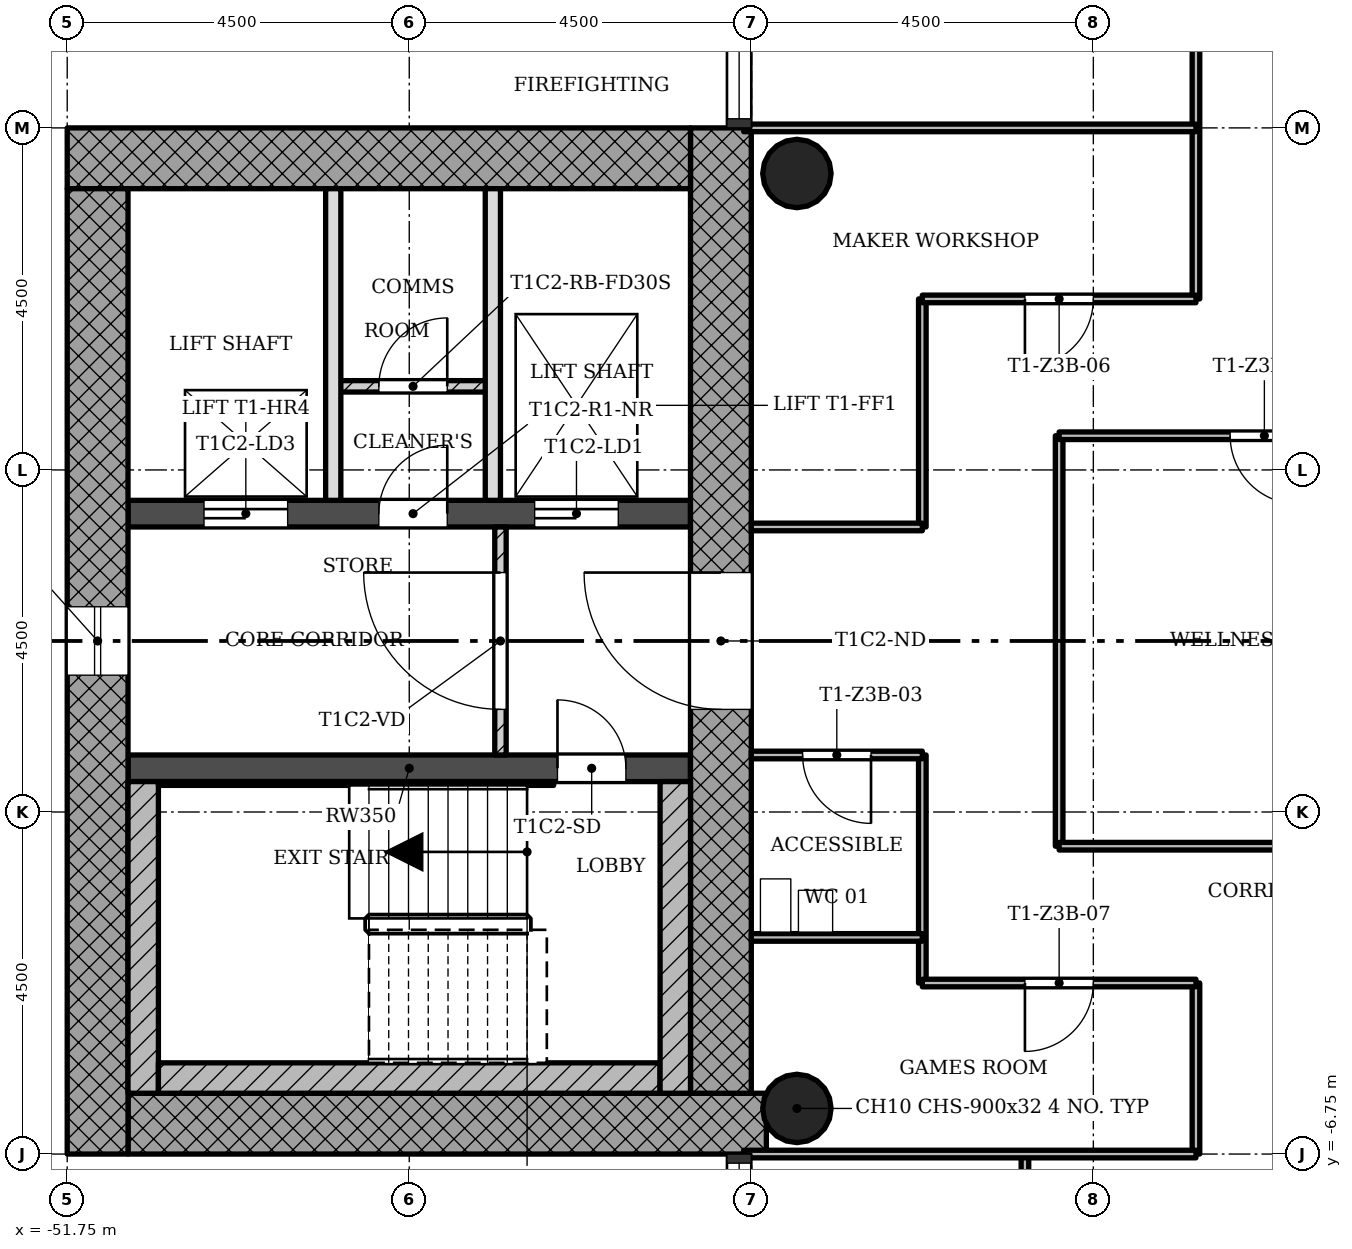
"""IFC4 building model, lengths in metres.
Left out: names, types, materials, properties, quantities, classifications, styles, units other than length and angle.
Written with IfcOpenShell. Run it as: python <this file> out.ifc"""

import sys

from ifc_helpers import new_model, si_unit, direction, frame, frame_2d, origin, origin_2d, place, context, subcontext, project, spatial, rectangle, hollow_circle, extrude, element, fill, save


model = new_model("IFC4")
c1 = context("Model", 3, precision=1e-05, world=origin(), true_north=direction((0.0, 1.0)))
c2 = subcontext(c1, "Body", "Model", "MODEL_VIEW")
j1 = project(units=[si_unit("LENGTHUNIT", "METRE"), si_unit("PLANEANGLEUNIT", "RADIAN")], contexts=[c1])
p1 = place(None, origin())
s1 = spatial("IfcSite", under=j1, at=p1, CompositionType="ELEMENT")
p2 = place(p1, origin())
s2 = spatial("IfcBuilding", under=s1, at=p2, CompositionType="ELEMENT")
p3 = place(p2, frame((0.0, 0.0, 143.9)))
s3 = spatial("IfcBuildingStorey", under=s2, at=p3, CompositionType="ELEMENT", Elevation=143.9)
p4 = place(p3, frame((-50.95, -6.35, 0.0), z_axis=(0.0, 0.0, 1.0), x_axis=(1.0, 0.0, 0.0)))
e1 = element("IfcWall", 1, at=p4, inside=s3, PredefinedType="SHEAR", context=c2, shape_type="SweptSolid", body=[
    extrude(rectangle(XDim=8.398, YDim=0.8, at=frame_2d((4.199, 0.0))), origin(), (0.0, 0.0, 1.0), 3.4),
])
p5 = place(p3, frame((-43.15, -5.95, 0.0), z_axis=(0.0, 0.0, 1.0), x_axis=(0.0, 1.0, 0.0)))
e2 = element("IfcWall", 2, at=p5, inside=s3, PredefinedType="SHEAR", context=c2, shape_type="SweptSolid", body=[
    extrude(rectangle(XDim=12.7, YDim=0.8, at=frame_2d((6.35, 0.0))), origin(), (0.0, 0.0, 1.0), 3.4),
])
p6 = place(p5, frame((5.05, 0.0, 0.0)))
e3 = element("IfcOpeningElement", 3, at=p6, cuts=e2, PredefinedType="OPENING", context=c2, shape_type="SweptSolid", body=[
    extrude(rectangle(XDim=1.8, YDim=2.1, at=frame_2d((0.9, 1.05))), frame((0.0, 0.41, 0.0), z_axis=(0.0, -1.0, 0.0), x_axis=(1.0, 0.0, 0.0)), (0.0, 0.0, 1.0), 0.82),
])
p7 = place(p3, frame((-43.55, 6.35, 0.0), z_axis=(0.0, 0.0, 1.0), x_axis=(-1.0, 0.0, 0.0)))
e4 = element("IfcWall", 4, at=p7, inside=s3, PredefinedType="SHEAR", context=c2, shape_type="SweptSolid", body=[
    extrude(rectangle(XDim=8.2, YDim=0.8, at=frame_2d((4.1, 0.0))), origin(), (0.0, 0.0, 1.0), 3.4),
])
p8 = place(p3, frame((-51.35, 5.95, 0.0), z_axis=(0.0, 0.0, 1.0), x_axis=(0.0, -1.0, 0.0)))
e5 = element("IfcWall", 5, at=p8, inside=s3, PredefinedType="SHEAR", context=c2, shape_type="SweptSolid", body=[
    extrude(rectangle(XDim=12.7, YDim=0.8, at=frame_2d((6.35, 0.0))), origin(), (0.0, 0.0, 1.0), 3.4),
])
p9 = place(p8, frame((5.5, 0.0, 0.45)))
e6 = element("IfcOpeningElement", 6, at=p9, cuts=e5, PredefinedType="OPENING", context=c2, shape_type="SweptSolid", body=[
    extrude(rectangle(XDim=0.9, YDim=2.4, at=frame_2d((0.45, 1.2))), frame((0.0, 0.41, 0.0), z_axis=(0.0, -1.0, 0.0), x_axis=(1.0, 0.0, 0.0)), (0.0, 0.0, 1.0), 0.82),
])
p10 = place(p3, frame((-50.95, -1.675, 0.0), z_axis=(0.0, 0.0, 1.0), x_axis=(1.0, 0.0, 0.0)))
e7 = element("IfcWall", 7, at=p10, inside=s3, PredefinedType="SHEAR", context=c2, shape_type="SweptSolid", body=[
    extrude(rectangle(XDim=7.4, YDim=0.35, at=frame_2d((3.7, 0.0))), origin(), (0.0, 0.0, 1.0), 3.4),
])
p11 = place(p10, frame((5.65, 0.0, 0.0)))
e8 = element("IfcOpeningElement", 8, at=p11, cuts=e7, PredefinedType="OPENING", context=c2, shape_type="SweptSolid", body=[
    extrude(rectangle(XDim=0.9, YDim=2.1, at=frame_2d((0.45, 1.05))), frame((0.0, 0.185, 0.0), z_axis=(0.0, -1.0, 0.0), x_axis=(1.0, 0.0, 0.0)), (0.0, 0.0, 1.0), 0.37),
])
p12 = place(p3, frame((-50.95, 1.675, 0.0), z_axis=(0.0, 0.0, 1.0), x_axis=(1.0, 0.0, 0.0)))
e9 = element("IfcWall", 9, at=p12, inside=s3, PredefinedType="SHEAR", context=c2, shape_type="SweptSolid", body=[
    extrude(rectangle(XDim=7.4, YDim=0.35, at=frame_2d((3.7, 0.0))), origin(), (0.0, 0.0, 1.0), 3.4),
])
p13 = place(p12, frame((5.35, 0.0, 0.0)))
e10 = element("IfcOpeningElement", 10, at=p13, cuts=e9, PredefinedType="OPENING", context=c2, shape_type="SweptSolid", body=[
    extrude(rectangle(XDim=1.1, YDim=2.1, at=frame_2d((0.55, 1.05))), frame((0.0, 0.185, 0.0), z_axis=(0.0, -1.0, 0.0), x_axis=(1.0, 0.0, 0.0)), (0.0, 0.0, 1.0), 0.37),
])
p14 = place(p12, frame((1.0, 0.0, 0.0)))
e11 = element("IfcOpeningElement", 11, at=p14, cuts=e9, PredefinedType="OPENING", context=c2, shape_type="SweptSolid", body=[
    extrude(rectangle(XDim=1.1, YDim=2.1, at=frame_2d((0.55, 1.05))), frame((0.0, 0.185, 0.0), z_axis=(0.0, -1.0, 0.0), x_axis=(1.0, 0.0, 0.0)), (0.0, 0.0, 1.0), 0.37),
])
p15 = place(p12, frame((3.3, 0.0, 0.0)))
e12 = element("IfcOpeningElement", 12, at=p15, cuts=e9, PredefinedType="OPENING", context=c2, shape_type="SweptSolid", body=[
    extrude(rectangle(XDim=0.9, YDim=2.1, at=frame_2d((0.45, 1.05))), frame((0.0, 0.185, 0.0), z_axis=(0.0, -1.0, 0.0), x_axis=(1.0, 0.0, 0.0)), (0.0, 0.0, 1.0), 0.37),
])
for number, where, z_axis, x_axis in (
    (13, (-42.15, -6.15, 0.0), (0.0, 0.0, 1.0), (1.0, 0.0, 0.0)),
    (14, (-42.15, 6.15, 0.0), (0.0, 0.0, 1.0), (1.0, 0.0, 0.0)),
):
    element("IfcColumn", number, at=place(p3, frame(where, z_axis=z_axis, x_axis=x_axis)), inside=s3, PredefinedType="COLUMN", context=c2, shape_type="SweptSolid", body=[
        extrude(hollow_circle(Radius=0.45, WallThickness=0.032, at=origin_2d()), origin(), (0.0, 0.0, 1.0), 3.4),
    ])
p16 = place(p3, frame((-46.05, 1.5, 0.0), z_axis=(0.0, 0.0, 1.0), x_axis=(0.0, -1.0, 0.0)))
e15 = element("IfcWall", 15, at=p16, inside=s3, PredefinedType="PARTITIONING", context=c2, shape_type="SweptSolid", body=[
    extrude(rectangle(XDim=3.0, YDim=0.15, at=frame_2d((1.5, 0.0))), origin(), (0.0, 0.0, 1.0), 3.0),
])
p17 = place(p16, frame((0.6, 0.0, 0.0)))
e16 = element("IfcOpeningElement", 16, at=p17, cuts=e15, PredefinedType="OPENING", context=c2, shape_type="SweptSolid", body=[
    extrude(rectangle(XDim=1.8, YDim=2.1, at=frame_2d((0.9, 1.05))), frame((0.0, 0.085, 0.0), z_axis=(0.0, -1.0, 0.0), x_axis=(1.0, 0.0, 0.0)), (0.0, 0.0, 1.0), 0.17),
])
for number, where, z_axis, x_axis in (
    (17, (-48.25, 5.95, 0.0), (0.0, 0.0, 1.0), (0.0, -1.0, 0.0)),
    (18, (-46.15, 5.95, 0.0), (0.0, 0.0, 1.0), (0.0, -1.0, 0.0)),
):
    element("IfcWall", number, at=place(p3, frame(where, z_axis=z_axis, x_axis=x_axis)), inside=s3, PredefinedType="SOLIDWALL", context=c2, shape_type="SweptSolid", body=[
        extrude(rectangle(XDim=4.1, YDim=0.2, at=frame_2d((2.05, 0.0))), origin(), (0.0, 0.0, 1.0), 3.0),
    ])
p18 = place(p3, frame((-46.15, 3.35, 0.0), z_axis=(0.0, 0.0, 1.0), x_axis=(-1.0, 0.0, 0.0)))
e19 = element("IfcWall", 19, at=p18, inside=s3, PredefinedType="PARTITIONING", context=c2, shape_type="SweptSolid", body=[
    extrude(rectangle(XDim=2.1, YDim=0.15, at=frame_2d((1.05, 0.0))), origin(), (0.0, 0.0, 1.0), 3.0),
])
p19 = place(p18, frame((0.6, 0.0, 0.0)))
e20 = element("IfcOpeningElement", 20, at=p19, cuts=e19, PredefinedType="OPENING", context=c2, shape_type="SweptSolid", body=[
    extrude(rectangle(XDim=0.9, YDim=2.1, at=frame_2d((0.45, 1.05))), frame((0.0, 0.085, 0.0), z_axis=(0.0, -1.0, 0.0), x_axis=(1.0, 0.0, 0.0)), (0.0, 0.0, 1.0), 0.17),
])
for number, where, z_axis, x_axis in (
    (21, (-40.5, -4.5, 0.0), (0.0, 0.0, 1.0), (0.0, 1.0, 0.0)),
    (22, (-40.5, 1.5, 0.0), (0.0, 0.0, 1.0), (0.0, 1.0, 0.0)),
):
    element("IfcWall", number, at=place(p3, frame(where, z_axis=z_axis, x_axis=x_axis)), inside=s3, PredefinedType="PARTITIONING", context=c2, shape_type="SweptSolid", body=[
        extrude(rectangle(XDim=3.0, YDim=0.1, at=frame_2d((1.5, 0.0))), origin(), (0.0, 0.0, 1.0), 3.0),
    ])
p20 = place(p3, frame((-39.15, -15.75, 0.0), z_axis=(0.0, 0.0, 1.0), x_axis=(0.0, 1.0, 0.0)))
e23 = element("IfcWall", 23, at=p20, inside=s3, PredefinedType="PARTITIONING", context=c2, shape_type="SweptSolid", body=[
    extrude(rectangle(XDim=9.0, YDim=0.1, at=frame_2d((4.5, 0.0))), origin(), (0.0, 0.0, 1.0), 3.0),
])
p21 = place(p20, frame((5.55, 0.0, 0.0)))
e24 = element("IfcOpeningElement", 24, at=p21, cuts=e23, PredefinedType="OPENING", context=c2, shape_type="SweptSolid", body=[
    extrude(rectangle(XDim=0.9, YDim=2.1, at=frame_2d((0.45, 1.05))), frame((0.0, 0.06, 0.0), z_axis=(0.0, -1.0, 0.0), x_axis=(1.0, 0.0, 0.0)), (0.0, 0.0, 1.0), 0.12),
])
p22 = place(p3, frame((-38.7, -2.7, 0.0), z_axis=(0.0, 0.0, 1.0), x_axis=(0.0, 1.0, 0.0)))
e25 = element("IfcWall", 25, at=p22, inside=s3, PredefinedType="PARTITIONING", context=c2, shape_type="SweptSolid", body=[
    extrude(rectangle(XDim=5.4, YDim=0.1, at=frame_2d((2.7, 0.0))), origin(), (0.0, 0.0, 1.0), 3.0),
])
p23 = place(p3, frame((-36.9, -6.75, 0.0), z_axis=(0.0, 0.0, 1.0), x_axis=(0.0, 1.0, 0.0)))
e26 = element("IfcWall", 26, at=p23, inside=s3, PredefinedType="PARTITIONING", context=c2, shape_type="SweptSolid", body=[
    extrude(rectangle(XDim=2.25, YDim=0.1, at=frame_2d((1.125, 0.0))), origin(), (0.0, 0.0, 1.0), 3.0),
])
p24 = place(p3, frame((-36.9, 4.5, 0.0), z_axis=(0.0, 0.0, 1.0), x_axis=(0.0, 1.0, 0.0)))
e27 = element("IfcWall", 27, at=p24, inside=s3, PredefinedType="PARTITIONING", context=c2, shape_type="SweptSolid", body=[
    extrude(rectangle(XDim=6.75, YDim=0.1, at=frame_2d((3.375, 0.0))), origin(), (0.0, 0.0, 1.0), 3.0),
])
p25 = place(p24, frame((4.05, 0.0, 0.0)))
e28 = element("IfcOpeningElement", 28, at=p25, cuts=e27, PredefinedType="OPENING", context=c2, shape_type="SweptSolid", body=[
    extrude(rectangle(XDim=0.9, YDim=2.1, at=frame_2d((0.45, 1.05))), frame((0.0, 0.06, 0.0), z_axis=(0.0, -1.0, 0.0), x_axis=(1.0, 0.0, 0.0)), (0.0, 0.0, 1.0), 0.12),
])
p26 = place(p3, frame((-42.85, -6.75, 0.0), z_axis=(0.0, 0.0, 1.0), x_axis=(1.0, 0.0, 0.0)))
e29 = element("IfcWall", 29, at=p26, inside=s3, PredefinedType="PARTITIONING", context=c2, shape_type="SweptSolid", body=[
    extrude(rectangle(XDim=5.95, YDim=0.1, at=frame_2d((2.975, 0.0))), origin(), (0.0, 0.0, 1.0), 3.0),
])
p27 = place(p3, frame((-40.5, -4.5, 0.0), z_axis=(0.0, 0.0, 1.0), x_axis=(1.0, 0.0, 0.0)))
e30 = element("IfcWall", 30, at=p27, inside=s3, PredefinedType="PARTITIONING", context=c2, shape_type="SweptSolid", body=[
    extrude(rectangle(XDim=3.6, YDim=0.1, at=frame_2d((1.8, 0.0))), origin(), (0.0, 0.0, 1.0), 3.0),
])
p28 = place(p27, frame((1.35, 0.0, 0.0)))
e31 = element("IfcOpeningElement", 31, at=p28, cuts=e30, PredefinedType="OPENING", context=c2, shape_type="SweptSolid", body=[
    extrude(rectangle(XDim=0.9, YDim=2.1, at=frame_2d((0.45, 1.05))), frame((0.0, 0.06, 0.0), z_axis=(0.0, -1.0, 0.0), x_axis=(1.0, 0.0, 0.0)), (0.0, 0.0, 1.0), 0.12),
])
p29 = place(p3, frame((-42.75, -3.9, 0.0), z_axis=(0.0, 0.0, 1.0), x_axis=(1.0, 0.0, 0.0)))
e32 = element("IfcWall", 32, at=p29, inside=s3, PredefinedType="PARTITIONING", context=c2, shape_type="SweptSolid", body=[
    extrude(rectangle(XDim=2.25, YDim=0.1, at=frame_2d((1.125, 0.0))), origin(), (0.0, 0.0, 1.0), 3.0),
])
p30 = place(p3, frame((-38.7, -2.7, 0.0), z_axis=(0.0, 0.0, 1.0), x_axis=(1.0, 0.0, 0.0)))
e33 = element("IfcWall", 33, at=p30, inside=s3, PredefinedType="PARTITIONING", context=c2, shape_type="SweptSolid", body=[
    extrude(rectangle(XDim=5.4, YDim=0.1, at=frame_2d((2.7, 0.0))), origin(), (0.0, 0.0, 1.0), 3.0),
])
p31 = place(p3, frame((-42.75, -1.5, 0.0), z_axis=(0.0, 0.0, 1.0), x_axis=(1.0, 0.0, 0.0)))
e34 = element("IfcWall", 34, at=p31, inside=s3, PredefinedType="PARTITIONING", context=c2, shape_type="SweptSolid", body=[
    extrude(rectangle(XDim=2.25, YDim=0.1, at=frame_2d((1.125, 0.0))), origin(), (0.0, 0.0, 1.0), 3.0),
])
p32 = place(p31, frame((0.675, 0.0, 0.0)))
e35 = element("IfcOpeningElement", 35, at=p32, cuts=e34, PredefinedType="OPENING", context=c2, shape_type="SweptSolid", body=[
    extrude(rectangle(XDim=0.9, YDim=2.1, at=frame_2d((0.45, 1.05))), frame((0.0, 0.06, 0.0), z_axis=(0.0, -1.0, 0.0), x_axis=(1.0, 0.0, 0.0)), (0.0, 0.0, 1.0), 0.12),
])
p33 = place(p3, frame((-42.75, 1.5, 0.0), z_axis=(0.0, 0.0, 1.0), x_axis=(1.0, 0.0, 0.0)))
e36 = element("IfcWall", 36, at=p33, inside=s3, PredefinedType="PARTITIONING", context=c2, shape_type="SweptSolid", body=[
    extrude(rectangle(XDim=2.25, YDim=0.1, at=frame_2d((1.125, 0.0))), origin(), (0.0, 0.0, 1.0), 3.0),
])
p34 = place(p3, frame((-38.7, 2.7, 0.0), z_axis=(0.0, 0.0, 1.0), x_axis=(1.0, 0.0, 0.0)))
e37 = element("IfcWall", 37, at=p34, inside=s3, PredefinedType="PARTITIONING", context=c2, shape_type="SweptSolid", body=[
    extrude(rectangle(XDim=5.4, YDim=0.1, at=frame_2d((2.7, 0.0))), origin(), (0.0, 0.0, 1.0), 3.0),
])
p35 = place(p34, frame((2.25, 0.0, 0.0)))
e38 = element("IfcOpeningElement", 38, at=p35, cuts=e37, PredefinedType="OPENING", context=c2, shape_type="SweptSolid", body=[
    extrude(rectangle(XDim=0.9, YDim=2.1, at=frame_2d((0.45, 1.05))), frame((0.0, 0.06, 0.0), z_axis=(0.0, -1.0, 0.0), x_axis=(1.0, 0.0, 0.0)), (0.0, 0.0, 1.0), 0.12),
])
p36 = place(p3, frame((-40.5, 4.5, 0.0), z_axis=(0.0, 0.0, 1.0), x_axis=(1.0, 0.0, 0.0)))
e39 = element("IfcWall", 39, at=p36, inside=s3, PredefinedType="PARTITIONING", context=c2, shape_type="SweptSolid", body=[
    extrude(rectangle(XDim=3.6, YDim=0.1, at=frame_2d((1.8, 0.0))), origin(), (0.0, 0.0, 1.0), 3.0),
])
p37 = place(p36, frame((1.35, 0.0, 0.0)))
e40 = element("IfcOpeningElement", 40, at=p37, cuts=e39, PredefinedType="OPENING", context=c2, shape_type="SweptSolid", body=[
    extrude(rectangle(XDim=0.9, YDim=2.1, at=frame_2d((0.45, 1.05))), frame((0.0, 0.06, 0.0), z_axis=(0.0, -1.0, 0.0), x_axis=(1.0, 0.0, 0.0)), (0.0, 0.0, 1.0), 0.12),
])
p38 = place(p3, frame((-42.85, 6.75, 0.0), z_axis=(0.0, 0.0, 1.0), x_axis=(1.0, 0.0, 0.0)))
e41 = element("IfcWall", 41, at=p38, inside=s3, PredefinedType="PARTITIONING", context=c2, shape_type="SweptSolid", body=[
    extrude(rectangle(XDim=5.95, YDim=0.1, at=frame_2d((2.975, 0.0))), origin(), (0.0, 0.0, 1.0), 3.0),
])
p39 = place(p3, frame((-50.75, -1.85, 0.0), z_axis=(0.0, 0.0, 1.0), x_axis=(0.0, -1.0, 0.0)))
e42 = element("IfcWall", 42, at=p39, inside=s3, PredefinedType="SHEAR", context=c2, shape_type="SweptSolid", body=[
    extrude(rectangle(XDim=4.1, YDim=0.4, at=frame_2d((2.05, 0.0))), origin(), (0.0, 0.0, 1.0), 3.4),
])
p40 = place(p3, frame((-43.95, -5.75, 0.0), z_axis=(0.0, 0.0, 1.0), x_axis=(-1.0, 0.0, 0.0)))
e43 = element("IfcWall", 43, at=p40, inside=s3, PredefinedType="SHEAR", context=c2, shape_type="SweptSolid", body=[
    extrude(rectangle(XDim=6.6, YDim=0.4, at=frame_2d((3.3, 0.0))), origin(), (0.0, 0.0, 1.0), 3.4),
])
p41 = place(p3, frame((-43.75, -1.85, 0.0), z_axis=(0.0, 0.0, 1.0), x_axis=(0.0, -1.0, 0.0)))
e44 = element("IfcWall", 44, at=p41, inside=s3, PredefinedType="SHEAR", context=c2, shape_type="SweptSolid", body=[
    extrude(rectangle(XDim=4.1, YDim=0.4, at=frame_2d((2.05, 0.0))), origin(), (0.0, 0.0, 1.0), 3.4),
])
p42 = place(p3, frame((-45.35, -1.875, 0.0), z_axis=(0.0, 0.0, 1.0), x_axis=(-1.0, 0.0, 0.0)))
e45 = element("IfcWall", 45, at=p42, inside=s3, PredefinedType="SHEAR", context=c2, shape_type="SweptSolid", body=[
    extrude(rectangle(XDim=5.2, YDim=0.05, at=frame_2d((2.6, 0.0))), origin(), (0.0, 0.0, 1.0), 3.4),
])
p43 = place(p9, origin())
e46 = element("IfcWindow", 46, at=p43, inside=s3, PartitioningType="SINGLE_PANEL", PredefinedType="WINDOW", context=c2, shape_type="SweptSolid", body=[
    extrude(rectangle(XDim=0.9, YDim=2.4, at=frame_2d((0.45, 1.2))), frame((0.0, 0.03, 0.0), z_axis=(0.0, -1.0, 0.0), x_axis=(1.0, 0.0, 0.0)), (0.0, 0.0, 1.0), 0.06),
])
fill(e6, e46)
p44 = place(p17, origin())
e47 = element("IfcDoor", 47, at=p44, inside=s3, OperationType="SINGLE_SWING_LEFT", PredefinedType="DOOR", context=c2, shape_type="SweptSolid", body=[
    extrude(rectangle(XDim=1.8, YDim=2.1, at=frame_2d((0.9, 1.05))), frame((0.0, 0.025, 0.0), z_axis=(0.0, -1.0, 0.0), x_axis=(1.0, 0.0, 0.0)), (0.0, 0.0, 1.0), 0.05),
])
fill(e16, e47)
p45 = place(p19, origin())
e48 = element("IfcDoor", 48, at=p45, inside=s3, OperationType="SINGLE_SWING_LEFT", PredefinedType="DOOR", context=c2, shape_type="SweptSolid", body=[
    extrude(rectangle(XDim=0.9, YDim=2.1, at=frame_2d((0.45, 1.05))), frame((0.0, 0.025, 0.0), z_axis=(0.0, -1.0, 0.0), x_axis=(1.0, 0.0, 0.0)), (0.0, 0.0, 1.0), 0.05),
])
fill(e20, e48)
p46 = place(p35, origin())
e49 = element("IfcDoor", 49, at=p46, inside=s3, OperationType="SINGLE_SWING_RIGHT", PredefinedType="DOOR", context=c2, shape_type="SweptSolid", body=[
    extrude(rectangle(XDim=0.9, YDim=2.1, at=frame_2d((0.45, 1.05))), frame((0.0, 0.025, 0.0), z_axis=(0.0, -1.0, 0.0), x_axis=(1.0, 0.0, 0.0)), (0.0, 0.0, 1.0), 0.05),
])
fill(e38, e49)
p47 = place(p32, origin())
e50 = element("IfcDoor", 50, at=p47, inside=s3, OperationType="SINGLE_SWING_RIGHT", PredefinedType="DOOR", context=c2, shape_type="SweptSolid", body=[
    extrude(rectangle(XDim=0.9, YDim=2.1, at=frame_2d((0.45, 1.05))), frame((0.0, 0.025, 0.0), z_axis=(0.0, -1.0, 0.0), x_axis=(1.0, 0.0, 0.0)), (0.0, 0.0, 1.0), 0.05),
])
fill(e35, e50)
p48 = place(p37, origin())
e51 = element("IfcDoor", 51, at=p48, inside=s3, OperationType="SINGLE_SWING_LEFT", PredefinedType="DOOR", context=c2, shape_type="SweptSolid", body=[
    extrude(rectangle(XDim=0.9, YDim=2.1, at=frame_2d((0.45, 1.05))), frame((0.0, 0.025, 0.0), z_axis=(0.0, -1.0, 0.0), x_axis=(1.0, 0.0, 0.0)), (0.0, 0.0, 1.0), 0.05),
])
fill(e40, e51)
p49 = place(p28, origin())
e52 = element("IfcDoor", 52, at=p49, inside=s3, OperationType="SINGLE_SWING_LEFT", PredefinedType="DOOR", context=c2, shape_type="SweptSolid", body=[
    extrude(rectangle(XDim=0.9, YDim=2.1, at=frame_2d((0.45, 1.05))), frame((0.0, 0.025, 0.0), z_axis=(0.0, -1.0, 0.0), x_axis=(1.0, 0.0, 0.0)), (0.0, 0.0, 1.0), 0.05),
])
fill(e31, e52)
p50 = place(p11, origin())
e53 = element("IfcDoor", 53, at=p50, inside=s3, OperationType="SINGLE_SWING_RIGHT", PredefinedType="DOOR", context=c2, shape_type="SweptSolid", body=[
    extrude(rectangle(XDim=0.9, YDim=2.1, at=frame_2d((0.45, 1.05))), frame((0.0, 0.025, 0.0), z_axis=(0.0, -1.0, 0.0), x_axis=(1.0, 0.0, 0.0)), (0.0, 0.0, 1.0), 0.05),
])
fill(e8, e53)
p51 = place(p13, origin())
e54 = element("IfcDoor", 54, at=p51, inside=s3, OperationType="SLIDING_TO_LEFT", PredefinedType="DOOR", context=c2, shape_type="SweptSolid", body=[
    extrude(rectangle(XDim=1.1, YDim=2.1, at=frame_2d((0.55, 1.05))), frame((0.0, 0.025, 0.0), z_axis=(0.0, -1.0, 0.0), x_axis=(1.0, 0.0, 0.0)), (0.0, 0.0, 1.0), 0.05),
])
fill(e10, e54)
p52 = place(p14, origin())
e55 = element("IfcDoor", 55, at=p52, inside=s3, OperationType="SLIDING_TO_LEFT", PredefinedType="DOOR", context=c2, shape_type="SweptSolid", body=[
    extrude(rectangle(XDim=1.1, YDim=2.1, at=frame_2d((0.55, 1.05))), frame((0.0, 0.025, 0.0), z_axis=(0.0, -1.0, 0.0), x_axis=(1.0, 0.0, 0.0)), (0.0, 0.0, 1.0), 0.05),
])
fill(e11, e55)
p53 = place(p15, origin())
e56 = element("IfcDoor", 56, at=p53, inside=s3, OperationType="SINGLE_SWING_LEFT", PredefinedType="DOOR", context=c2, shape_type="SweptSolid", body=[
    extrude(rectangle(XDim=0.9, YDim=2.1, at=frame_2d((0.45, 1.05))), frame((0.0, 0.025, 0.0), z_axis=(0.0, -1.0, 0.0), x_axis=(1.0, 0.0, 0.0)), (0.0, 0.0, 1.0), 0.05),
])
fill(e12, e56)
p54 = place(p6, origin())
e57 = element("IfcDoor", 57, at=p54, inside=s3, OperationType="SINGLE_SWING_LEFT", PredefinedType="DOOR", context=c2, shape_type="SweptSolid", body=[
    extrude(rectangle(XDim=1.8, YDim=2.1, at=frame_2d((0.9, 1.05))), frame((0.0, 0.025, 0.0), z_axis=(0.0, -1.0, 0.0), x_axis=(1.0, 0.0, 0.0)), (0.0, 0.0, 1.0), 0.05),
])
fill(e3, e57)
save(model, sys.argv[1])
